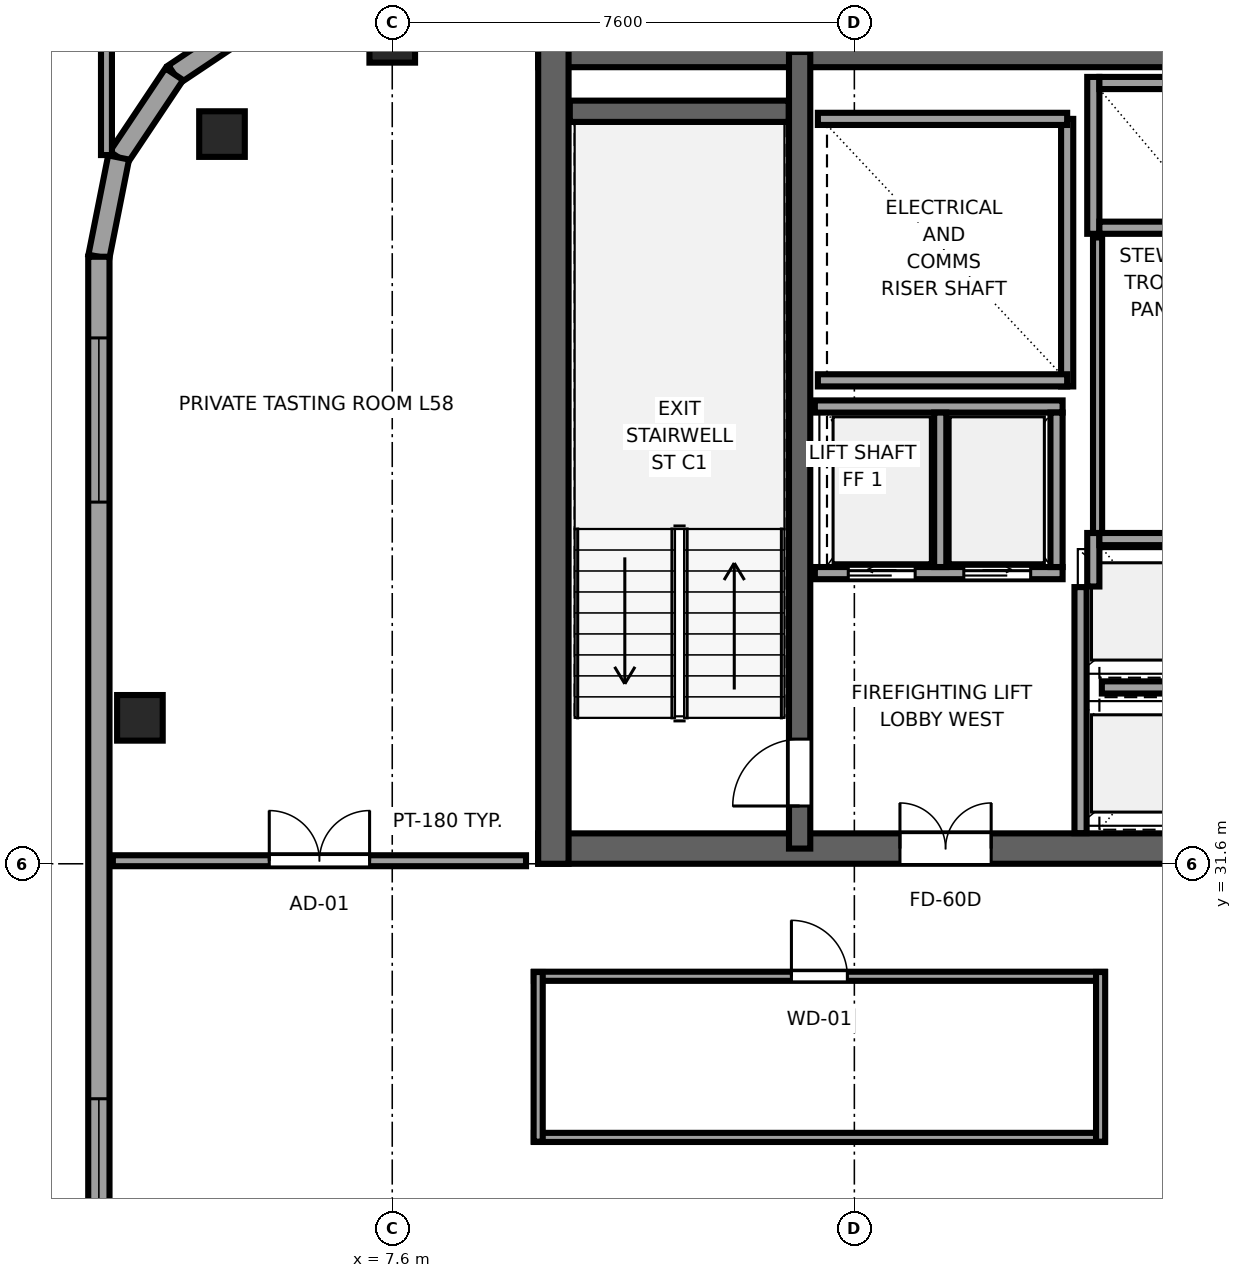
"""IFC4 building model, lengths in metres.
Left out: names, types, materials, properties, quantities, classifications, styles, units other than length and angle.
Written with IfcOpenShell. Run it as: python <this file> out.ifc"""

import sys

from ifc_helpers import new_model, si_unit, direction, frame, frame_2d, origin, origin_2d, place, context, subcontext, project, spatial, rectangle, extrude, source, transform, mapped, element, fill, save


model = new_model("IFC4")
c1 = context("Model", 3, precision=1e-05, world=origin(), true_north=direction((0.0, 1.0)))
c2 = subcontext(c1, "Body", "Model", "MODEL_VIEW")
j1 = project(units=[si_unit("LENGTHUNIT", "METRE"), si_unit("PLANEANGLEUNIT", "RADIAN")], contexts=[c1])
p1 = place(None, origin())
s1 = spatial("IfcSite", under=j1, at=p1, CompositionType="ELEMENT")
p2 = place(p1, origin())
s2 = spatial("IfcBuilding", under=s1, at=p2, CompositionType="ELEMENT")
p3 = place(p2, frame((0.0, 0.0, 220.35)))
s3 = spatial("IfcBuildingStorey", under=s2, at=p3, CompositionType="ELEMENT", Elevation=220.35)
p4 = place(p3, frame((10.0, 31.85, 0.0), z_axis=(0.0, 0.0, 1.0), x_axis=(1.0, 0.0, 0.0)))
e1 = element("IfcWall", 1, at=p4, inside=s3, PredefinedType="SHEAR", context=c2, shape_type="SweptSolid", body=[
    extrude(rectangle(XDim=26.0, YDim=0.5, at=frame_2d((13.0, 0.0))), origin(), (0.0, 0.0, 1.0), 3.55),
])
p5 = place(p4, frame((7.45, 0.0, 0.0), z_axis=(0.0, 0.0, 1.0), x_axis=(-1.0, 0.0, 0.0)))
e2 = element("IfcOpeningElement", 2, at=p5, cuts=e1, PredefinedType="OPENING", context=c2, shape_type="SweptSolid", body=[
    extrude(rectangle(XDim=1.5, YDim=2.04, at=frame_2d((0.75, 1.02))), frame((0.0, 0.26, 0.0), z_axis=(0.0, -1.0, 0.0), x_axis=(1.0, 0.0, 0.0)), (0.0, 0.0, 1.0), 0.52),
])
p6 = place(p4, frame((13.75, 0.0, 0.0), z_axis=(0.0, 0.0, 1.0), x_axis=(-1.0, 0.0, 0.0)))
e3 = element("IfcOpeningElement", 3, at=p6, cuts=e1, PredefinedType="OPENING", context=c2, shape_type="SweptSolid", body=[
    extrude(rectangle(XDim=1.5, YDim=2.04, at=frame_2d((0.75, 1.02))), frame((0.0, 0.26, 0.0), z_axis=(0.0, -1.0, 0.0), x_axis=(1.0, 0.0, 0.0)), (0.0, 0.0, 1.0), 0.52),
])
p7 = place(p4, frame((20.05, 0.0, 0.0), z_axis=(0.0, 0.0, 1.0), x_axis=(-1.0, 0.0, 0.0)))
e4 = element("IfcOpeningElement", 4, at=p7, cuts=e1, PredefinedType="OPENING", context=c2, shape_type="SweptSolid", body=[
    extrude(rectangle(XDim=1.5, YDim=2.04, at=frame_2d((0.75, 1.02))), frame((0.0, 0.26, 0.0), z_axis=(0.0, -1.0, 0.0), x_axis=(1.0, 0.0, 0.0)), (0.0, 0.0, 1.0), 0.52),
])
p8 = place(p3, frame((10.0, 44.95, 0.0), z_axis=(0.0, 0.0, 1.0), x_axis=(1.0, 0.0, 0.0)))
e5 = element("IfcWall", 5, at=p8, inside=s3, PredefinedType="SHEAR", context=c2, shape_type="SweptSolid", body=[
    extrude(rectangle(XDim=26.0, YDim=0.5, at=frame_2d((13.0, 0.0))), origin(), (0.0, 0.0, 1.0), 3.55),
])
p9 = place(p3, frame((10.25, 31.6, 0.0), z_axis=(0.0, 0.0, 1.0), x_axis=(0.0, 1.0, 0.0)))
e6 = element("IfcWall", 6, at=p9, inside=s3, PredefinedType="SHEAR", context=c2, shape_type="SweptSolid", body=[
    extrude(rectangle(XDim=13.6, YDim=0.5, at=frame_2d((6.8, 0.0))), origin(), (0.0, 0.0, 1.0), 3.55),
])
p10 = place(p3, frame((14.3, 31.85, 0.0), z_axis=(0.0, 0.0, 1.0), x_axis=(0.0, 1.0, 0.0)))
e7 = element("IfcWall", 7, at=p10, inside=s3, PredefinedType="SHEAR", context=c2, shape_type="SweptSolid", body=[
    extrude(rectangle(XDim=13.1, YDim=0.35, at=frame_2d((6.55, 0.0))), origin(), (0.0, 0.0, 1.0), 3.55),
])
p11 = place(p10, frame((0.7, 0.0, 0.0)))
e8 = element("IfcOpeningElement", 8, at=p11, cuts=e7, PredefinedType="OPENING", context=c2, shape_type="SweptSolid", body=[
    extrude(rectangle(XDim=1.1, YDim=2.12, at=frame_2d((0.55, 1.06))), frame((0.0, 0.185, 0.0), z_axis=(0.0, -1.0, 0.0), x_axis=(1.0, 0.0, 0.0)), (0.0, 0.0, 1.0), 0.37),
])
p12 = place(p3, frame((10.52, 43.975, 0.0), z_axis=(0.0, 0.0, 1.0), x_axis=(1.0, 0.0, 0.0)))
e9 = element("IfcWall", 9, at=p12, inside=s3, PredefinedType="SHEAR", context=c2, shape_type="SweptSolid", body=[
    extrude(rectangle(XDim=3.6, YDim=0.35, at=frame_2d((1.8, 0.0))), origin(), (0.0, 0.0, 1.0), 3.55),
])
m1 = source(origin(), c2, "Body", "SweptSolid", [
    extrude(rectangle(XDim=0.75, YDim=0.75, at=origin_2d()), origin(), (0.0, 0.0, 1.0), 3.55),
])
for number, where, z_axis, x_axis in (
    (10, (4.8, 43.6, 0.0), (0.0, 0.0, 1.0), (1.0, 0.0, 0.0)),
    (11, (7.6, 45.15, 0.0), (0.0, 0.0, 1.0), (1.0, 0.0, 0.0)),
    (12, (3.45, 34.0, 0.0), (0.0, 0.0, 1.0), (1.0, 0.0, 0.0)),
):
    element("IfcColumn", number, at=place(p3, frame(where, z_axis=z_axis, x_axis=x_axis)), inside=s3, PredefinedType="COLUMN", context=c2, shape_type="MappedRepresentation", body=[
        mapped(m1, transform((0.0, 0.0, 0.0), x_axis=(1.0, 0.0, 0.0), y_axis=(0.0, 1.0, 0.0), z_axis=(0.0, 0.0, 1.0), scale=1.0)),
    ])
for number, where, z_axis, x_axis in (
    (13, (5.385, 45.5, 0.0), (0.0, 0.0, 1.0), (-0.832, -0.556, 0.0)),
    (14, (4.015, 44.585, 0.0), (0.0, 0.0, 1.0), (-0.556, -0.831, 0.0)),
):
    element("IfcWall", number, at=place(p3, frame(where, z_axis=z_axis, x_axis=x_axis)), inside=s3, PredefinedType="SOLIDWALL", context=c2, shape_type="SweptSolid", body=[
        extrude(rectangle(XDim=1.647, YDim=0.35, at=frame_2d((0.824, 0.0))), origin(), (0.0, 0.0, 1.0), 2.9),
    ])
p13 = place(p3, frame((3.1, 43.216, 0.0), z_axis=(0.0, 0.0, 1.0), x_axis=(-0.195044345786, -0.980794424524, 0.0)))
e15 = element("IfcWall", 15, at=p13, inside=s3, PredefinedType="SOLIDWALL", context=c2, shape_type="SweptSolid", body=[
    extrude(rectangle(XDim=1.665, YDim=0.35, at=frame_2d((0.833, 0.0))), origin(), (0.0, 0.0, 1.0), 3.37),
])
p14 = place(p3, frame((2.775, 41.583, 0.0), z_axis=(0.0, 0.0, 1.0), x_axis=(0.0, -1.0, 0.0)))
e16 = element("IfcWall", 16, at=p14, inside=s3, PredefinedType="SOLIDWALL", context=c2, shape_type="SweptSolid", body=[
    extrude(rectangle(XDim=34.566, YDim=0.35, at=frame_2d((17.283, 0.0))), origin(), (0.0, 0.0, 1.0), 3.37),
])
p15 = place(p14, frame((1.335, 0.0, 0.68)))
e17 = element("IfcOpeningElement", 17, at=p15, cuts=e16, PredefinedType="OPENING", context=c2, shape_type="SweptSolid", body=[
    extrude(rectangle(XDim=2.7, YDim=1.95, at=frame_2d((1.35, 0.975))), frame((0.0, 0.185, 0.0), z_axis=(0.0, -1.0, 0.0), x_axis=(1.0, 0.0, 0.0)), (0.0, 0.0, 1.0), 0.37),
])
p16 = place(p14, frame((13.847, 0.0, 0.68)))
e18 = element("IfcOpeningElement", 18, at=p16, cuts=e16, PredefinedType="OPENING", context=c2, shape_type="SweptSolid", body=[
    extrude(rectangle(XDim=2.7, YDim=1.95, at=frame_2d((1.35, 0.975))), frame((0.0, 0.185, 0.0), z_axis=(0.0, -1.0, 0.0), x_axis=(1.0, 0.0, 0.0)), (0.0, 0.0, 1.0), 0.37),
])
p17 = place(p14, frame((18.018, 0.0, 0.68)))
e19 = element("IfcOpeningElement", 19, at=p17, cuts=e16, PredefinedType="OPENING", context=c2, shape_type="SweptSolid", body=[
    extrude(rectangle(XDim=2.7, YDim=1.95, at=frame_2d((1.35, 0.975))), frame((0.0, 0.185, 0.0), z_axis=(0.0, -1.0, 0.0), x_axis=(1.0, 0.0, 0.0)), (0.0, 0.0, 1.0), 0.37),
])
p18 = place(p14, frame((22.189, 0.0, 0.68)))
e20 = element("IfcOpeningElement", 20, at=p18, cuts=e16, PredefinedType="OPENING", context=c2, shape_type="SweptSolid", body=[
    extrude(rectangle(XDim=2.7, YDim=1.95, at=frame_2d((1.35, 0.975))), frame((0.0, 0.185, 0.0), z_axis=(0.0, -1.0, 0.0), x_axis=(1.0, 0.0, 0.0)), (0.0, 0.0, 1.0), 0.37),
])
p19 = place(p14, frame((29.98, 0.0, 0.68)))
e21 = element("IfcOpeningElement", 21, at=p19, cuts=e16, PredefinedType="OPENING", context=c2, shape_type="SweptSolid", body=[
    extrude(rectangle(XDim=2.7, YDim=1.95, at=frame_2d((1.35, 0.975))), frame((0.0, 0.185, 0.0), z_axis=(0.0, -1.0, 0.0), x_axis=(1.0, 0.0, 0.0)), (0.0, 0.0, 1.0), 0.37),
])
p20 = place(p3, frame((18.7, 39.45, 0.0), z_axis=(0.0, 0.0, 1.0), x_axis=(0.0, 1.0, 0.0)))
e22 = element("IfcWall", 22, at=p20, inside=s3, PredefinedType="SOLIDWALL", context=c2, shape_type="SweptSolid", body=[
    extrude(rectangle(XDim=4.4, YDim=0.2, at=frame_2d((2.2, 0.0))), origin(), (0.0, 0.0, 1.0), 3.37),
])
for number, where, z_axis, x_axis in (
    (23, (14.6, 39.55, 0.0), (0.0, 0.0, 1.0), (1.0, 0.0, 0.0)),
    (24, (14.6, 43.85, 0.0), (0.0, 0.0, 1.0), (1.0, 0.0, 0.0)),
):
    element("IfcWall", number, at=place(p3, frame(where, z_axis=z_axis, x_axis=x_axis)), inside=s3, PredefinedType="SOLIDWALL", context=c2, shape_type="SweptSolid", body=[
        extrude(rectangle(XDim=4.1, YDim=0.2, at=frame_2d((2.05, 0.0))), origin(), (0.0, 0.0, 1.0), 3.37),
    ])
p21 = place(p3, frame((18.92, 32.104, 0.0), z_axis=(0.0, 0.0, 1.0), x_axis=(0.0, 1.0, 0.0)))
e25 = element("IfcWall", 25, at=p21, inside=s3, PredefinedType="SOLIDWALL", context=c2, shape_type="SweptSolid", body=[
    extrude(rectangle(XDim=4.046, YDim=0.2, at=frame_2d((2.023, 0.0))), origin(), (0.0, 0.0, 1.0), 3.37),
])
p22 = place(p3, frame((19.13, 36.16, 0.0), z_axis=(0.0, 0.0, 1.0), x_axis=(0.0, 1.0, 0.0)))
e26 = element("IfcWall", 26, at=p22, inside=s3, PredefinedType="SOLIDWALL", context=c2, shape_type="SweptSolid", body=[
    extrude(rectangle(XDim=0.88, YDim=0.2, at=frame_2d((0.44, 0.0))), origin(), (0.0, 0.0, 1.0), 3.37),
])
p23 = place(p3, frame((19.23, 36.94, 0.0), z_axis=(0.0, 0.0, 1.0), x_axis=(1.0, 0.0, 0.0)))
e27 = element("IfcWall", 27, at=p23, inside=s3, PredefinedType="SOLIDWALL", context=c2, shape_type="SweptSolid", body=[
    extrude(rectangle(XDim=1.84, YDim=0.2, at=frame_2d((0.92, 0.0))), origin(), (0.0, 0.0, 1.0), 3.37),
])
p24 = place(p3, frame((19.27, 34.5, 0.0), z_axis=(0.0, 0.0, 1.0), x_axis=(1.0, 0.0, 0.0)))
e28 = element("IfcWall", 28, at=p24, inside=s3, PredefinedType="SOLIDWALL", context=c2, shape_type="SweptSolid", body=[
    extrude(rectangle(XDim=1.8, YDim=0.2, at=frame_2d((0.9, 0.0))), origin(), (0.0, 0.0, 1.0), 3.37),
])
p25 = place(p3, frame((19.13, 41.96, 0.0), z_axis=(0.0, 0.0, 1.0), x_axis=(0.0, 1.0, 0.0)))
e29 = element("IfcWall", 29, at=p25, inside=s3, PredefinedType="SOLIDWALL", context=c2, shape_type="SweptSolid", body=[
    extrude(rectangle(XDim=2.58, YDim=0.2, at=frame_2d((1.29, 0.0))), origin(), (0.0, 0.0, 1.0), 3.37),
])
for number, where, z_axis, x_axis in (
    (30, (19.23, 42.06, 0.0), (0.0, 0.0, 1.0), (1.0, 0.0, 0.0)),
    (31, (19.23, 44.44, 0.0), (0.0, 0.0, 1.0), (1.0, 0.0, 0.0)),
):
    element("IfcWall", number, at=place(p3, frame(where, z_axis=z_axis, x_axis=x_axis)), inside=s3, PredefinedType="SOLIDWALL", context=c2, shape_type="SweptSolid", body=[
        extrude(rectangle(XDim=1.84, YDim=0.2, at=frame_2d((0.92, 0.0))), origin(), (0.0, 0.0, 1.0), 3.37),
    ])
p26 = place(p3, frame((14.55, 36.38, 0.0), z_axis=(0.0, 0.0, 1.0), x_axis=(1.0, 0.0, 0.0)))
e32 = element("IfcWall", 32, at=p26, inside=s3, PredefinedType="SOLIDWALL", context=c2, shape_type="SweptSolid", body=[
    extrude(rectangle(XDim=4.075, YDim=0.2, at=frame_2d((2.038, 0.0))), origin(), (0.0, 0.0, 1.0), 3.37),
])
p27 = place(p26, frame((0.55, 0.0, 0.0)))
e33 = element("IfcOpeningElement", 33, at=p27, cuts=e32, PredefinedType="OPENING", context=c2, shape_type="SweptSolid", body=[
    extrude(rectangle(XDim=1.1, YDim=2.12, at=frame_2d((0.55, 1.06))), frame((0.0, 0.11, 0.0), z_axis=(0.0, -1.0, 0.0), x_axis=(1.0, 0.0, 0.0)), (0.0, 0.0, 1.0), 0.22),
])
p28 = place(p26, frame((2.45, 0.0, 0.0)))
e34 = element("IfcOpeningElement", 34, at=p28, cuts=e32, PredefinedType="OPENING", context=c2, shape_type="SweptSolid", body=[
    extrude(rectangle(XDim=1.1, YDim=2.12, at=frame_2d((0.55, 1.06))), frame((0.0, 0.11, 0.0), z_axis=(0.0, -1.0, 0.0), x_axis=(1.0, 0.0, 0.0)), (0.0, 0.0, 1.0), 0.22),
])
p29 = place(p3, frame((14.55, 39.12, 0.0), z_axis=(0.0, 0.0, 1.0), x_axis=(1.0, 0.0, 0.0)))
e35 = element("IfcWall", 35, at=p29, inside=s3, PredefinedType="SOLIDWALL", context=c2, shape_type="SweptSolid", body=[
    extrude(rectangle(XDim=4.075, YDim=0.2, at=frame_2d((2.038, 0.0))), origin(), (0.0, 0.0, 1.0), 3.37),
])
for number, where, z_axis, x_axis in (
    (36, (18.525, 36.48, 0.0), (0.0, 0.0, 1.0), (0.0, 1.0, 0.0)),
    (37, (16.613, 36.48, 0.0), (0.0, 0.0, 1.0), (0.0, 1.0, 0.0)),
):
    element("IfcWall", number, at=place(p3, frame(where, z_axis=z_axis, x_axis=x_axis)), inside=s3, PredefinedType="SOLIDWALL", context=c2, shape_type="SweptSolid", body=[
        extrude(rectangle(XDim=2.54, YDim=0.2, at=frame_2d((1.27, 0.0))), origin(), (0.0, 0.0, 1.0), 3.37),
    ])
p30 = place(p3, frame((19.2, 37.04, 0.0), z_axis=(0.0, 0.0, 1.0), x_axis=(0.0, 1.0, 0.0)))
e38 = element("IfcWall", 38, at=p30, inside=s3, PredefinedType="PARTITIONING", context=c2, shape_type="SweptSolid", body=[
    extrude(rectangle(XDim=4.86, YDim=0.15, at=frame_2d((2.43, 0.0))), origin(), (0.0, 0.0, 1.0), 3.37),
])
p31 = place(p3, frame((3.005, 31.65, 0.0), z_axis=(0.0, 0.0, 1.0), x_axis=(1.0, 0.0, 0.0)))
e39 = element("IfcWall", 39, at=p31, inside=s3, PredefinedType="PARTITIONING", context=c2, shape_type="SweptSolid", body=[
    extrude(rectangle(XDim=6.795, YDim=0.18, at=frame_2d((3.397, 0.0))), origin(), (0.0, 0.0, 1.0), 3.37),
])
p32 = place(p31, frame((2.573, 0.0, 0.0)))
e40 = element("IfcOpeningElement", 40, at=p32, cuts=e39, PredefinedType="OPENING", context=c2, shape_type="SweptSolid", body=[
    extrude(rectangle(XDim=1.65, YDim=2.15, at=frame_2d((0.825, 1.075))), frame((0.0, 0.1, 0.0), z_axis=(0.0, -1.0, 0.0), x_axis=(1.0, 0.0, 0.0)), (0.0, 0.0, 1.0), 0.2),
])
p33 = place(p3, frame((2.9, 43.255, 0.0), z_axis=(0.0, 0.0, 1.0), x_axis=(0.0, 1.0, 0.0)))
e41 = element("IfcWall", 41, at=p33, inside=s3, PredefinedType="PARTITIONING", context=c2, shape_type="SweptSolid", body=[
    extrude(rectangle(XDim=2.445, YDim=0.18, at=frame_2d((1.223, 0.0))), origin(), (0.0, 0.0, 1.0), 3.37),
])
p34 = place(p3, frame((9.93, 27.1, 0.0), z_axis=(0.0, 0.0, 1.0), x_axis=(1.0, 0.0, 0.0)))
e42 = element("IfcWall", 42, at=p34, inside=s3, PredefinedType="PARTITIONING", context=c2, shape_type="SweptSolid", body=[
    extrude(rectangle(XDim=9.39, YDim=0.15, at=frame_2d((4.695, 0.0))), origin(), (0.0, 0.0, 1.0), 3.37),
])
p35 = place(p3, frame((9.93, 29.75, 0.0), z_axis=(0.0, 0.0, 1.0), x_axis=(1.0, 0.0, 0.0)))
e43 = element("IfcWall", 43, at=p35, inside=s3, PredefinedType="PARTITIONING", context=c2, shape_type="SweptSolid", body=[
    extrude(rectangle(XDim=9.39, YDim=0.15, at=frame_2d((4.695, 0.0))), origin(), (0.0, 0.0, 1.0), 3.37),
])
p36 = place(p35, frame((4.235, 0.0, 0.0)))
e44 = element("IfcOpeningElement", 44, at=p36, cuts=e43, PredefinedType="OPENING", context=c2, shape_type="SweptSolid", body=[
    extrude(rectangle(XDim=0.92, YDim=2.01, at=frame_2d((0.46, 1.005))), frame((0.0, 0.085, 0.0), z_axis=(0.0, -1.0, 0.0), x_axis=(1.0, 0.0, 0.0)), (0.0, 0.0, 1.0), 0.17),
])
for number, where, z_axis, x_axis in (
    (45, (10.0, 27.03, 0.0), (0.0, 0.0, 1.0), (0.0, 1.0, 0.0)),
    (46, (19.25, 27.03, 0.0), (0.0, 0.0, 1.0), (0.0, 1.0, 0.0)),
):
    element("IfcWall", number, at=place(p3, frame(where, z_axis=z_axis, x_axis=x_axis)), inside=s3, PredefinedType="PARTITIONING", context=c2, shape_type="SweptSolid", body=[
        extrude(rectangle(XDim=2.79, YDim=0.15, at=frame_2d((1.395, 0.0))), origin(), (0.0, 0.0, 1.0), 3.37),
    ])
m2 = source(origin(), c2, "Body", "SweptSolid", [
    extrude(rectangle(XDim=2.7, YDim=1.95, at=frame_2d((1.35, 0.975))), frame((0.0, 0.09, 0.0), z_axis=(0.0, -1.0, 0.0), x_axis=(1.0, 0.0, 0.0)), (0.0, 0.0, 1.0), 0.06),
])
p37 = place(p15, origin())
e47 = element("IfcWindow", 47, at=p37, inside=s3, PartitioningType="TRIPLE_PANEL_HORIZONTAL", PredefinedType="WINDOW", context=c2, shape_type="MappedRepresentation", body=[
    mapped(m2, transform((0.0, 0.0, 0.0), x_axis=(1.0, 0.0, 0.0), y_axis=(0.0, 1.0, 0.0), z_axis=(0.0, 0.0, 1.0), scale=1.0)),
])
fill(e17, e47)
p38 = place(p16, origin())
e48 = element("IfcWindow", 48, at=p38, inside=s3, PartitioningType="TRIPLE_PANEL_HORIZONTAL", PredefinedType="WINDOW", context=c2, shape_type="MappedRepresentation", body=[
    mapped(m2, transform((0.0, 0.0, 0.0), x_axis=(1.0, 0.0, 0.0), y_axis=(0.0, 1.0, 0.0), z_axis=(0.0, 0.0, 1.0), scale=1.0)),
])
fill(e18, e48)
m3 = source(origin(), c2, "Body", "SweptSolid", [
    extrude(rectangle(XDim=1.1, YDim=2.12, at=frame_2d((0.55, 1.06))), frame((0.0, 0.025, 0.0), z_axis=(0.0, -1.0, 0.0), x_axis=(1.0, 0.0, 0.0)), (0.0, 0.0, 1.0), 0.05),
])
p39 = place(p11, origin())
e49 = element("IfcDoor", 49, at=p39, inside=s3, OperationType="SINGLE_SWING_LEFT", PredefinedType="DOOR", context=c2, shape_type="MappedRepresentation", body=[
    mapped(m3, transform((0.0, 0.0, 0.0), x_axis=(1.0, 0.0, 0.0), y_axis=(0.0, 1.0, 0.0), z_axis=(0.0, 0.0, 1.0), scale=1.0)),
])
fill(e8, e49)
m4 = source(origin(), c2, "Body", "SweptSolid", [
    extrude(rectangle(XDim=1.5, YDim=2.04, at=frame_2d((0.75, 1.02))), frame((0.0, 0.025, 0.0), z_axis=(0.0, -1.0, 0.0), x_axis=(1.0, 0.0, 0.0)), (0.0, 0.0, 1.0), 0.05),
])
p40 = place(p5, origin())
e50 = element("IfcDoor", 50, at=p40, inside=s3, OperationType="DOUBLE_DOOR_SINGLE_SWING", PredefinedType="DOOR", context=c2, shape_type="MappedRepresentation", body=[
    mapped(m4, transform((0.0, 0.0, 0.0), x_axis=(1.0, 0.0, 0.0), y_axis=(0.0, 1.0, 0.0), z_axis=(0.0, 0.0, 1.0), scale=1.0)),
])
fill(e2, e50)
m5 = source(origin(), c2, "Body", "SweptSolid", [
    extrude(rectangle(XDim=1.1, YDim=2.12, at=frame_2d((0.55, 1.06))), frame((0.0, 0.025, 0.0), z_axis=(0.0, -1.0, 0.0), x_axis=(1.0, 0.0, 0.0)), (0.0, 0.0, 1.0), 0.05),
])
p41 = place(p27, origin())
e51 = element("IfcDoor", 51, at=p41, inside=s3, OperationType="SLIDING_TO_LEFT", PredefinedType="DOOR", context=c2, shape_type="MappedRepresentation", body=[
    mapped(m5, transform((0.0, 0.0, 0.0), x_axis=(1.0, 0.0, 0.0), y_axis=(0.0, 1.0, 0.0), z_axis=(0.0, 0.0, 1.0), scale=1.0)),
])
fill(e33, e51)
p42 = place(p28, origin())
e52 = element("IfcDoor", 52, at=p42, inside=s3, OperationType="SLIDING_TO_RIGHT", PredefinedType="DOOR", context=c2, shape_type="MappedRepresentation", body=[
    mapped(m5, transform((0.0, 0.0, 0.0), x_axis=(1.0, 0.0, 0.0), y_axis=(0.0, 1.0, 0.0), z_axis=(0.0, 0.0, 1.0), scale=1.0)),
])
fill(e34, e52)
m6 = source(origin(), c2, "Body", "SweptSolid", [
    extrude(rectangle(XDim=1.65, YDim=2.15, at=frame_2d((0.825, 1.075))), frame((0.0, 0.025, 0.0), z_axis=(0.0, -1.0, 0.0), x_axis=(1.0, 0.0, 0.0)), (0.0, 0.0, 1.0), 0.05),
])
p43 = place(p32, origin())
e53 = element("IfcDoor", 53, at=p43, inside=s3, OperationType="DOUBLE_DOOR_SINGLE_SWING", PredefinedType="DOOR", context=c2, shape_type="MappedRepresentation", body=[
    mapped(m6, transform((0.0, 0.0, 0.0), x_axis=(1.0, 0.0, 0.0), y_axis=(0.0, 1.0, 0.0), z_axis=(0.0, 0.0, 1.0), scale=1.0)),
])
fill(e40, e53)
m7 = source(origin(), c2, "Body", "SweptSolid", [
    extrude(rectangle(XDim=0.92, YDim=2.01, at=frame_2d((0.46, 1.005))), frame((0.0, 0.025, 0.0), z_axis=(0.0, -1.0, 0.0), x_axis=(1.0, 0.0, 0.0)), (0.0, 0.0, 1.0), 0.05),
])
p44 = place(p36, origin())
e54 = element("IfcDoor", 54, at=p44, inside=s3, OperationType="SINGLE_SWING_LEFT", PredefinedType="DOOR", context=c2, shape_type="MappedRepresentation", body=[
    mapped(m7, transform((0.0, 0.0, 0.0), x_axis=(1.0, 0.0, 0.0), y_axis=(0.0, 1.0, 0.0), z_axis=(0.0, 0.0, 1.0), scale=1.0)),
])
fill(e44, e54)
save(model, sys.argv[1])
